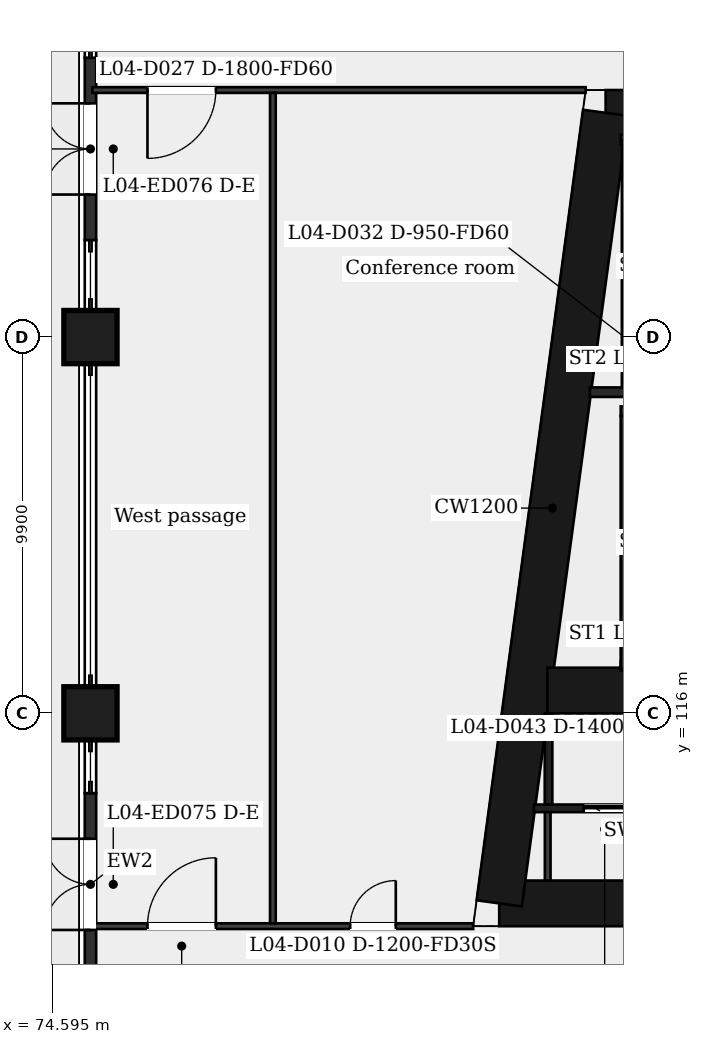
"""IFC4 building model, lengths in metres.
Left out: names, types, materials, properties, quantities, classifications, styles, units other than length and angle.
Written with IfcOpenShell. Run it as: python <this file> out.ifc"""

import sys

from ifc_helpers import new_model, si_unit, direction, frame, frame_2d, origin, origin_2d, place, context, subcontext, project, spatial, rectangle, extrude, element, fill, save


model = new_model("IFC4")
c1 = context("Model", 3, precision=1e-05, world=origin(), true_north=direction((0.0, 1.0)))
c2 = subcontext(c1, "Body", "Model", "MODEL_VIEW")
j1 = project(units=[si_unit("LENGTHUNIT", "METRE"), si_unit("PLANEANGLEUNIT", "RADIAN")], contexts=[c1])
p1 = place(None, origin())
s1 = spatial("IfcSite", under=j1, at=p1, CompositionType="ELEMENT")
p2 = place(p1, origin())
s2 = spatial("IfcBuilding", under=s1, at=p2, CompositionType="ELEMENT")
p3 = place(p2, frame((0.0, 0.0, 29.0)))
s3 = spatial("IfcBuildingStorey", under=s2, at=p3, CompositionType="ELEMENT", Elevation=29.0)
p4 = place(p3, frame((89.156, 131.8, 0.0), z_axis=(0.0, 0.0, 1.0), x_axis=(1.0, 0.0, 0.0)))
e1 = element("IfcWall", 1, at=p4, inside=s3, PredefinedType="SHEAR", context=c2, shape_type="SweptSolid", body=[
    extrude(rectangle(XDim=11.044, YDim=1.2, at=frame_2d((5.522, 0.0))), origin(), (0.0, 0.0, 1.0), 5.0),
])
p5 = place(p4, frame((6.458, 0.0, 0.0)))
e2 = element("IfcOpeningElement", 2, at=p5, cuts=e1, PredefinedType="OPENING", context=c2, shape_type="SweptSolid", body=[
    extrude(rectangle(XDim=1.2, YDim=2.1, at=frame_2d((0.6, 1.05))), frame((0.0, 0.61, 0.0), z_axis=(0.0, -1.0, 0.0), x_axis=(1.0, 0.0, 0.0)), (0.0, 0.0, 1.0), 1.22),
])
p6 = place(p3, frame((100.2, 111.0, 0.0), z_axis=(0.0, 0.0, 1.0), x_axis=(-1.0, 0.0, 0.0)))
e3 = element("IfcWall", 3, at=p6, inside=s3, PredefinedType="SHEAR", context=c2, shape_type="SweptSolid", body=[
    extrude(rectangle(XDim=13.844, YDim=1.2, at=frame_2d((6.922, 0.0))), origin(), (0.0, 0.0, 1.0), 5.0),
])
p7 = place(p6, frame((5.694, 0.0, 0.0)))
e4 = element("IfcOpeningElement", 4, at=p7, cuts=e3, PredefinedType="OPENING", context=c2, shape_type="SweptSolid", body=[
    extrude(rectangle(XDim=1.4, YDim=2.1, at=frame_2d((0.7, 1.05))), frame((0.0, 0.61, 0.0), z_axis=(0.0, -1.0, 0.0), x_axis=(1.0, 0.0, 0.0)), (0.0, 0.0, 1.0), 1.22),
])
p8 = place(p3, frame((86.355, 111.0, 0.0), z_axis=(0.0, 0.0, 1.0), x_axis=(0.133413989637, 0.99106039542, 0.0)))
e5 = element("IfcWall", 5, at=p8, inside=s3, PredefinedType="SHEAR", context=c2, shape_type="SweptSolid", body=[
    extrude(rectangle(XDim=20.988, YDim=1.2, at=frame_2d((10.494, 0.0))), origin(), (0.0, 0.0, 1.0), 5.0),
])
p9 = place(p3, frame((87.623, 116.6, 0.0), z_axis=(0.0, 0.0, 1.0), x_axis=(1.0, 0.0, 0.0)))
e6 = element("IfcWall", 6, at=p9, inside=s3, PredefinedType="SHEAR", context=c2, shape_type="SweptSolid", body=[
    extrude(rectangle(XDim=5.077, YDim=1.2, at=frame_2d((2.539, 0.0))), origin(), (0.0, 0.0, 1.0), 5.0),
])
for number, where, z_axis, x_axis in (
    (7, (75.6, 116.0, 0.0), (0.0, 0.0, 1.0), (1.0, 0.0, 0.0)),
    (8, (75.6, 125.9, 0.0), (0.0, 0.0, 1.0), (1.0, 0.0, 0.0)),
):
    element("IfcColumn", number, at=place(p3, frame(where, z_axis=z_axis, x_axis=x_axis)), inside=s3, PredefinedType="COLUMN", context=c2, shape_type="SweptSolid", body=[
        extrude(rectangle(XDim=1.4, YDim=1.4, at=origin_2d()), origin(), (0.0, 0.0, 1.0), 5.0),
    ])
p10 = place(p3, frame((75.6, 109.1, 0.0), z_axis=(0.0, 0.0, 1.0), x_axis=(0.0, 1.0, 0.0)))
e9 = element("IfcWall", 9, at=p10, inside=s3, PredefinedType="SOLIDWALL", context=c2, shape_type="SweptSolid", body=[
    extrude(rectangle(XDim=4.8, YDim=0.3, at=frame_2d((2.4, 0.0))), origin(), (0.0, 0.0, 1.0), 4.4),
])
p11 = place(p10, frame((1.2, 0.0, 0.0)))
e10 = element("IfcOpeningElement", 10, at=p11, cuts=e9, PredefinedType="OPENING", context=c2, shape_type="SweptSolid", body=[
    extrude(rectangle(XDim=2.4, YDim=2.4, at=frame_2d((1.2, 1.2))), frame((0.0, 0.16, 0.0), z_axis=(0.0, -1.0, 0.0), x_axis=(1.0, 0.0, 0.0)), (0.0, 0.0, 1.0), 0.32),
])
p12 = place(p3, frame((75.6, 128.45, 0.0), z_axis=(0.0, 0.0, 1.0), x_axis=(0.0, 1.0, 0.0)))
e11 = element("IfcWall", 11, at=p12, inside=s3, PredefinedType="SOLIDWALL", context=c2, shape_type="SweptSolid", body=[
    extrude(rectangle(XDim=4.8, YDim=0.3, at=frame_2d((2.4, 0.0))), origin(), (0.0, 0.0, 1.0), 4.4),
])
p13 = place(p12, frame((1.2, 0.0, 0.0)))
e12 = element("IfcOpeningElement", 12, at=p13, cuts=e11, PredefinedType="OPENING", context=c2, shape_type="SweptSolid", body=[
    extrude(rectangle(XDim=2.4, YDim=2.4, at=frame_2d((1.2, 1.2))), frame((0.0, 0.16, 0.0), z_axis=(0.0, -1.0, 0.0), x_axis=(1.0, 0.0, 0.0)), (0.0, 0.0, 1.0), 0.32),
])
p14 = place(p3, frame((75.65, 110.4, 0.0), z_axis=(0.0, 0.0, 1.0), x_axis=(1.0, 0.0, 0.0)))
e13 = element("IfcWall", 13, at=p14, inside=s3, PredefinedType="PARTITIONING", context=c2, shape_type="SweptSolid", body=[
    extrude(rectangle(XDim=10.019, YDim=0.15, at=frame_2d((5.01, 0.0))), origin(), (0.0, 0.0, 1.0), 4.4),
])
p15 = place(p14, frame((6.784, 0.0, 0.0)))
e14 = element("IfcOpeningElement", 14, at=p15, cuts=e13, PredefinedType="OPENING", context=c2, shape_type="SweptSolid", body=[
    extrude(rectangle(XDim=1.2, YDim=2.1, at=frame_2d((0.6, 1.05))), frame((0.0, 0.085, 0.0), z_axis=(0.0, -1.0, 0.0), x_axis=(1.0, 0.0, 0.0)), (0.0, 0.0, 1.0), 0.17),
])
p16 = place(p14, frame((1.45, 0.0, 0.0)))
e15 = element("IfcOpeningElement", 15, at=p16, cuts=e13, PredefinedType="OPENING", context=c2, shape_type="SweptSolid", body=[
    extrude(rectangle(XDim=1.8, YDim=2.1, at=frame_2d((0.9, 1.05))), frame((0.0, 0.085, 0.0), z_axis=(0.0, -1.0, 0.0), x_axis=(1.0, 0.0, 0.0)), (0.0, 0.0, 1.0), 0.17),
])
p17 = place(p3, frame((87.267, 113.5, 0.0), z_axis=(0.0, 0.0, 1.0), x_axis=(1.0, 0.0, 0.0)))
e16 = element("IfcWall", 16, at=p17, inside=s3, PredefinedType="PARTITIONING", context=c2, shape_type="SweptSolid", body=[
    extrude(rectangle(XDim=5.66, YDim=0.2, at=frame_2d((2.83, 0.0))), origin(), (0.0, 0.0, 1.0), 4.4),
])
p18 = place(p17, frame((1.312, 0.0, 0.0)))
e17 = element("IfcOpeningElement", 17, at=p18, cuts=e16, PredefinedType="OPENING", context=c2, shape_type="SweptSolid", body=[
    extrude(rectangle(XDim=1.1, YDim=2.1, at=frame_2d((0.55, 1.05))), frame((0.0, 0.11, 0.0), z_axis=(0.0, -1.0, 0.0), x_axis=(1.0, 0.0, 0.0)), (0.0, 0.0, 1.0), 0.22),
])
p19 = place(p17, frame((3.631, 0.0, 0.0)))
e18 = element("IfcOpeningElement", 18, at=p19, cuts=e16, PredefinedType="OPENING", context=c2, shape_type="SweptSolid", body=[
    extrude(rectangle(XDim=1.1, YDim=2.1, at=frame_2d((0.55, 1.05))), frame((0.0, 0.11, 0.0), z_axis=(0.0, -1.0, 0.0), x_axis=(1.0, 0.0, 0.0)), (0.0, 0.0, 1.0), 0.22),
])
for number, where, z_axis, x_axis in (
    (19, (89.552, 117.245, 0.0), (0.0, 0.0, 1.0), (1.0, 0.0, 0.0)),
    (20, (89.552, 123.95, 0.0), (0.0, 0.0, 1.0), (1.0, 0.0, 0.0)),
):
    element("IfcWall", number, at=place(p3, frame(where, z_axis=z_axis, x_axis=x_axis)), inside=s3, PredefinedType="PARTITIONING", context=c2, shape_type="SweptSolid", body=[
        extrude(rectangle(XDim=3.4, YDim=0.25, at=frame_2d((1.7, 0.0))), origin(), (0.0, 0.0, 1.0), 4.4),
    ])
p20 = place(p3, frame((88.741, 124.45, 0.0), z_axis=(0.0, 0.0, 1.0), x_axis=(1.0, 0.0, 0.0)))
e21 = element("IfcWall", 21, at=p20, inside=s3, PredefinedType="PARTITIONING", context=c2, shape_type="SweptSolid", body=[
    extrude(rectangle(XDim=4.21, YDim=0.25, at=frame_2d((2.105, 0.0))), origin(), (0.0, 0.0, 1.0), 4.4),
])
p21 = place(p3, frame((89.552, 131.101, 0.0), z_axis=(0.0, 0.0, 1.0), x_axis=(1.0, 0.0, 0.0)))
e22 = element("IfcWall", 22, at=p21, inside=s3, PredefinedType="PARTITIONING", context=c2, shape_type="SweptSolid", body=[
    extrude(rectangle(XDim=3.4, YDim=0.25, at=frame_2d((1.7, 0.0))), origin(), (0.0, 0.0, 1.0), 4.4),
])
p22 = place(p3, frame((75.65, 132.4, 0.0), z_axis=(0.0, 0.0, 1.0), x_axis=(1.0, 0.0, 0.0)))
e23 = element("IfcWall", 23, at=p22, inside=s3, PredefinedType="PARTITIONING", context=c2, shape_type="SweptSolid", body=[
    extrude(rectangle(XDim=12.981, YDim=0.15, at=frame_2d((6.491, 0.0))), origin(), (0.0, 0.0, 1.0), 4.4),
])
p23 = place(p22, frame((1.45, 0.0, 0.0)))
e24 = element("IfcOpeningElement", 24, at=p23, cuts=e23, PredefinedType="OPENING", context=c2, shape_type="SweptSolid", body=[
    extrude(rectangle(XDim=1.8, YDim=2.1, at=frame_2d((0.9, 1.05))), frame((0.0, 0.085, 0.0), z_axis=(0.0, -1.0, 0.0), x_axis=(1.0, 0.0, 0.0)), (0.0, 0.0, 1.0), 0.17),
])
p24 = place(p3, frame((80.4, 110.475, 0.0), z_axis=(0.0, 0.0, 1.0), x_axis=(0.0, 1.0, 0.0)))
e25 = element("IfcWall", 25, at=p24, inside=s3, PredefinedType="PARTITIONING", context=c2, shape_type="SweptSolid", body=[
    extrude(rectangle(XDim=21.85, YDim=0.15, at=frame_2d((10.925, 0.0))), origin(), (0.0, 0.0, 1.0), 4.4),
])
p25 = place(p3, frame((87.653, 113.6, 0.0), z_axis=(0.0, 0.0, 1.0), x_axis=(0.0, 1.0, 0.0)))
e26 = element("IfcWall", 26, at=p25, inside=s3, PredefinedType="PARTITIONING", context=c2, shape_type="SweptSolid", body=[
    extrude(rectangle(XDim=2.4, YDim=0.2, at=frame_2d((1.2, 0.0))), origin(), (0.0, 0.0, 1.0), 4.4),
])
p26 = place(p3, frame((87.631, 111.6, 0.0), z_axis=(0.0, 0.0, 1.0), x_axis=(0.0, 1.0, 0.0)))
e27 = element("IfcWall", 27, at=p26, inside=s3, PredefinedType="PARTITIONING", context=c2, shape_type="SweptSolid", body=[
    extrude(rectangle(XDim=1.8, YDim=0.15, at=frame_2d((0.9, 0.0))), origin(), (0.0, 0.0, 1.0), 4.4),
])
p27 = place(p3, frame((89.677, 117.17, 0.0), z_axis=(0.0, 0.0, 1.0), x_axis=(0.0, 1.0, 0.0)))
e28 = element("IfcWall", 28, at=p27, inside=s3, PredefinedType="PARTITIONING", context=c2, shape_type="SweptSolid", body=[
    extrude(rectangle(XDim=6.655, YDim=0.25, at=frame_2d((3.328, 0.0))), origin(), (0.0, 0.0, 1.0), 4.4),
])
p28 = place(p3, frame((89.707, 124.575, 0.0), z_axis=(0.0, 0.0, 1.0), x_axis=(0.0, 1.0, 0.0)))
e29 = element("IfcWall", 29, at=p28, inside=s3, PredefinedType="PARTITIONING", context=c2, shape_type="SweptSolid", body=[
    extrude(rectangle(XDim=6.5, YDim=0.25, at=frame_2d((3.25, 0.0))), origin(), (0.0, 0.0, 1.0), 4.4),
])
p29 = place(p11, origin())
e30 = element("IfcDoor", 30, at=p29, inside=s3, OperationType="DOUBLE_DOOR_DOUBLE_SWING", PredefinedType="DOOR", context=c2, shape_type="SweptSolid", body=[
    extrude(rectangle(XDim=2.4, YDim=2.4, at=frame_2d((1.2, 1.2))), frame((0.0, 0.025, 0.0), z_axis=(0.0, -1.0, 0.0), x_axis=(1.0, 0.0, 0.0)), (0.0, 0.0, 1.0), 0.05),
])
fill(e10, e30)
p30 = place(p13, origin())
e31 = element("IfcDoor", 31, at=p30, inside=s3, OperationType="DOUBLE_DOOR_DOUBLE_SWING", PredefinedType="DOOR", context=c2, shape_type="SweptSolid", body=[
    extrude(rectangle(XDim=2.4, YDim=2.4, at=frame_2d((1.2, 1.2))), frame((0.0, 0.025, 0.0), z_axis=(0.0, -1.0, 0.0), x_axis=(1.0, 0.0, 0.0)), (0.0, 0.0, 1.0), 0.05),
])
fill(e12, e31)
p31 = place(p15, origin())
e32 = element("IfcDoor", 32, at=p31, inside=s3, OperationType="SINGLE_SWING_RIGHT", PredefinedType="DOOR", context=c2, shape_type="SweptSolid", body=[
    extrude(rectangle(XDim=1.2, YDim=2.1, at=frame_2d((0.6, 1.05))), frame((0.0, 0.025, 0.0), z_axis=(0.0, -1.0, 0.0), x_axis=(1.0, 0.0, 0.0)), (0.0, 0.0, 1.0), 0.05),
])
fill(e14, e32)
p32 = place(p16, origin())
e33 = element("IfcDoor", 33, at=p32, inside=s3, OperationType="SINGLE_SWING_RIGHT", PredefinedType="DOOR", context=c2, shape_type="SweptSolid", body=[
    extrude(rectangle(XDim=1.8, YDim=2.1, at=frame_2d((0.9, 1.05))), frame((0.0, 0.025, 0.0), z_axis=(0.0, -1.0, 0.0), x_axis=(1.0, 0.0, 0.0)), (0.0, 0.0, 1.0), 0.05),
])
fill(e15, e33)
p33 = place(p23, origin())
e34 = element("IfcDoor", 34, at=p33, inside=s3, OperationType="SINGLE_SWING_LEFT", PredefinedType="DOOR", context=c2, shape_type="SweptSolid", body=[
    extrude(rectangle(XDim=1.8, YDim=2.1, at=frame_2d((0.9, 1.05))), frame((0.0, 0.025, 0.0), z_axis=(0.0, -1.0, 0.0), x_axis=(1.0, 0.0, 0.0)), (0.0, 0.0, 1.0), 0.05),
])
fill(e24, e34)
p34 = place(p18, origin())
e35 = element("IfcDoor", 35, at=p34, inside=s3, OperationType="SLIDING_TO_LEFT", PredefinedType="DOOR", context=c2, shape_type="SweptSolid", body=[
    extrude(rectangle(XDim=1.1, YDim=2.1, at=frame_2d((0.55, 1.05))), frame((0.0, 0.025, 0.0), z_axis=(0.0, -1.0, 0.0), x_axis=(1.0, 0.0, 0.0)), (0.0, 0.0, 1.0), 0.05),
])
fill(e17, e35)
save(model, sys.argv[1])
